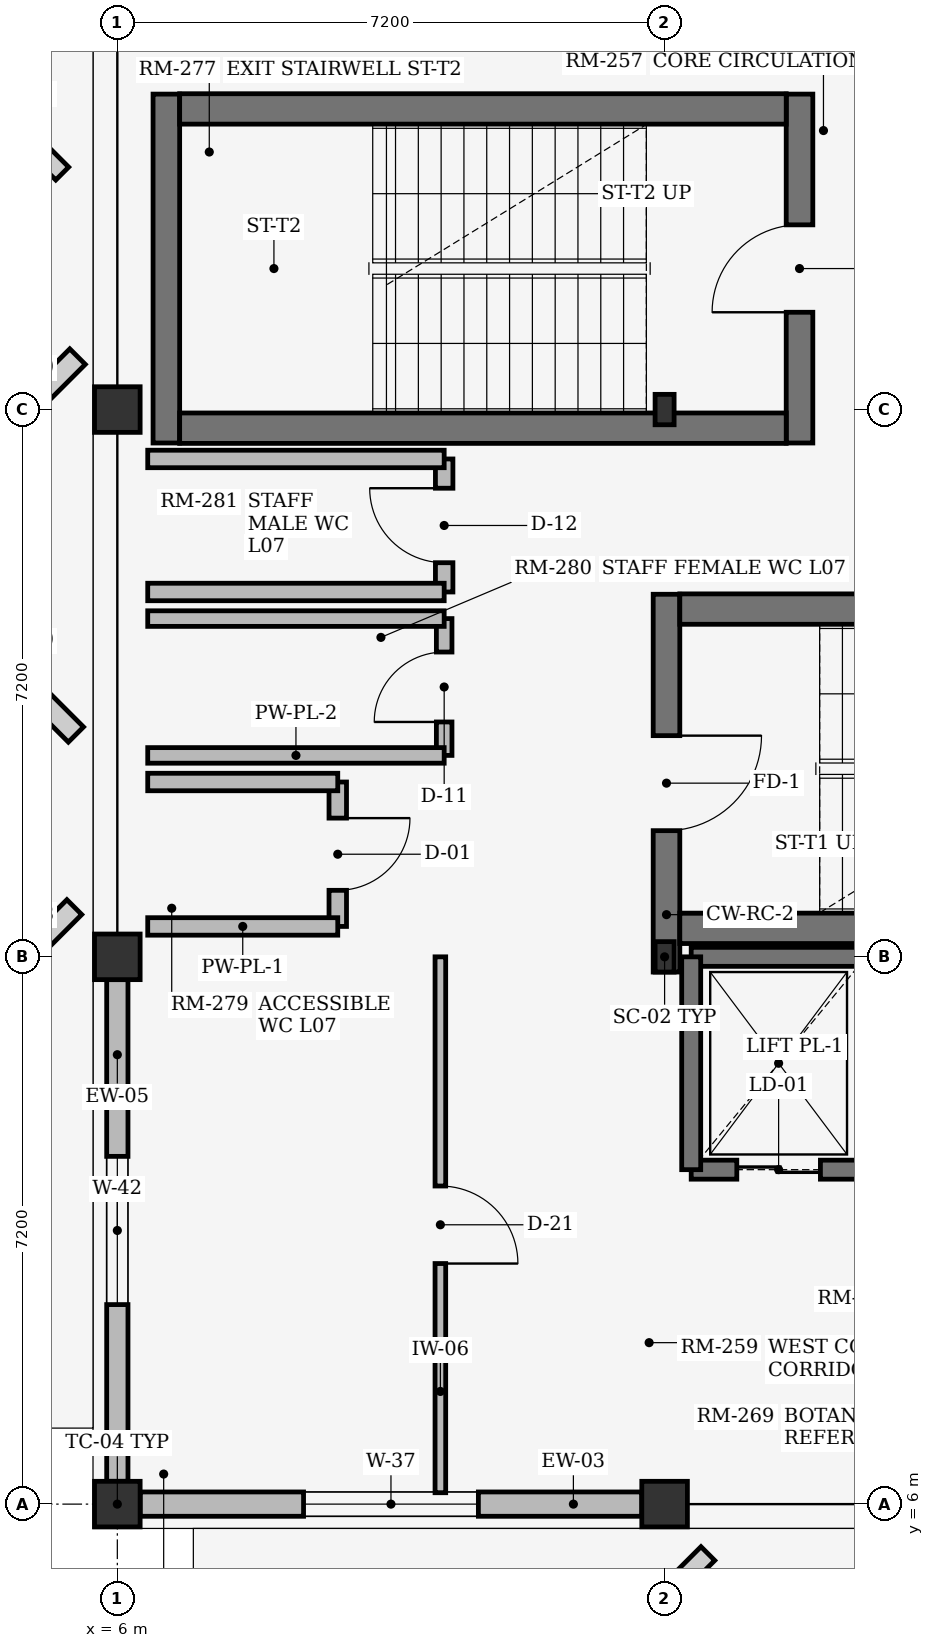
"""IFC4 building model, lengths in metres.
Left out: names, types, materials, properties, quantities, classifications, styles, units other than length and angle.
Written with IfcOpenShell. Run it as: python <this file> out.ifc"""

import sys

from ifc_helpers import new_model, si_unit, direction, frame, frame_2d, origin, origin_2d, place, context, subcontext, project, spatial, rectangle, i_section, extrude, element, fill, save


model = new_model("IFC4")
c1 = context("Model", 3, precision=1e-05, world=origin(), true_north=direction((0.0, 1.0)))
c2 = subcontext(c1, "Body", "Model", "MODEL_VIEW")
j1 = project(units=[si_unit("LENGTHUNIT", "METRE"), si_unit("PLANEANGLEUNIT", "RADIAN")], contexts=[c1])
p1 = place(None, origin())
s1 = spatial("IfcSite", under=j1, at=p1, CompositionType="ELEMENT")
p2 = place(p1, origin())
s2 = spatial("IfcBuilding", under=s1, at=p2, CompositionType="ELEMENT")
p3 = place(p2, frame((0.0, 0.0, 28.8)))
s3 = spatial("IfcBuildingStorey", under=s2, at=p3, CompositionType="ELEMENT", Elevation=28.8)
for number, where, z_axis, x_axis in (
    (1, (6.0, 6.0, 0.0), (0.0, 0.0, 1.0), (1.0, 0.0, 0.0)),
    (2, (6.0, 13.2, 0.0), (0.0, 0.0, 1.0), (1.0, 0.0, 0.0)),
    (3, (6.0, 20.4, 0.0), (0.0, 0.0, 1.0), (1.0, 0.0, 0.0)),
    (4, (13.2, 6.0, 0.0), (0.0, 0.0, 1.0), (1.0, 0.0, 0.0)),
):
    element("IfcColumn", number, at=place(p3, frame(where, z_axis=z_axis, x_axis=x_axis)), inside=s3, PredefinedType="COLUMN", context=c2, shape_type="SweptSolid", body=[
        extrude(rectangle(XDim=0.6, YDim=0.6, at=origin_2d()), origin(), (0.0, 0.0, 1.0), 3.62),
    ])
for number, where, z_axis, x_axis in (
    (5, (13.2, 13.2, 0.0), (0.0, 0.0, 1.0), (1.0, 0.0, 0.0)),
    (6, (13.2, 20.4, 0.0), (0.0, 0.0, 1.0), (1.0, 0.0, 0.0)),
):
    element("IfcColumn", number, at=place(p3, frame(where, z_axis=z_axis, x_axis=x_axis)), inside=s3, PredefinedType="COLUMN", context=c2, shape_type="SweptSolid", body=[
        extrude(i_section(OverallWidth=0.25, OverallDepth=0.4, WebThickness=0.01, FlangeThickness=0.013, at=origin_2d()), origin(), (0.0, 0.0, 1.0), 3.62),
    ])
p4 = place(p3, frame((6.3, 6.0, 0.0), z_axis=(0.0, 0.0, 1.0), x_axis=(1.0, 0.0, 0.0)))
e7 = element("IfcWall", 7, at=p4, inside=s3, PredefinedType="STANDARD", context=c2, shape_type="SweptSolid", body=[
    extrude(rectangle(XDim=6.6, YDim=0.32, at=frame_2d((3.3, 0.0))), origin(), (0.0, 0.0, 1.0), 3.1),
])
p5 = place(p4, frame((2.15, 0.0, 0.75)))
e8 = element("IfcOpeningElement", 8, at=p5, cuts=e7, PredefinedType="OPENING", context=c2, shape_type="SweptSolid", body=[
    extrude(rectangle(XDim=2.3, YDim=1.35, at=frame_2d((1.15, 0.675))), frame((0.0, 0.17, 0.0), z_axis=(0.0, -1.0, 0.0), x_axis=(1.0, 0.0, 0.0)), (0.0, 0.0, 1.0), 0.34),
])
p6 = place(p3, frame((6.0, 6.3, 0.0), z_axis=(0.0, 0.0, 1.0), x_axis=(0.0, 1.0, 0.0)))
e9 = element("IfcWall", 9, at=p6, inside=s3, PredefinedType="STANDARD", context=c2, shape_type="SweptSolid", body=[
    extrude(rectangle(XDim=6.6, YDim=0.28, at=frame_2d((3.3, 0.0))), origin(), (0.0, 0.0, 1.0), 3.1),
])
p7 = place(p6, frame((2.325, 0.0, 0.75)))
e10 = element("IfcOpeningElement", 10, at=p7, cuts=e9, PredefinedType="OPENING", context=c2, shape_type="SweptSolid", body=[
    extrude(rectangle(XDim=1.95, YDim=1.5, at=frame_2d((0.975, 0.75))), frame((0.0, 0.15, 0.0), z_axis=(0.0, -1.0, 0.0), x_axis=(1.0, 0.0, 0.0)), (0.0, 0.0, 1.0), 0.3),
])
p8 = place(p3, frame((13.225, 13.0, 0.0), z_axis=(0.0, 0.0, 1.0), x_axis=(0.0, 1.0, 0.0)))
e11 = element("IfcWall", 11, at=p8, inside=s3, PredefinedType="SHEAR", context=c2, shape_type="SweptSolid", body=[
    extrude(rectangle(XDim=4.97, YDim=0.35, at=frame_2d((2.485, 0.0))), origin(), (0.0, 0.0, 1.0), 3.62),
])
p9 = place(p8, frame((1.86, 0.0, 0.0)))
e12 = element("IfcOpeningElement", 12, at=p9, cuts=e11, PredefinedType="OPENING", context=c2, shape_type="SweptSolid", body=[
    extrude(rectangle(XDim=1.25, YDim=2.2, at=frame_2d((0.625, 1.1))), frame((0.0, 0.185, 0.0), z_axis=(0.0, -1.0, 0.0), x_axis=(1.0, 0.0, 0.0)), (0.0, 0.0, 1.0), 0.37),
])
for number, where, z_axis, x_axis in (
    (13, (13.4, 13.575, 0.0), (0.0, 0.0, 1.0), (1.0, 0.0, 0.0)),
    (14, (13.4, 17.775, 0.0), (0.0, 0.0, 1.0), (1.0, 0.0, 0.0)),
):
    element("IfcWall", number, at=place(p3, frame(where, z_axis=z_axis, x_axis=x_axis)), inside=s3, PredefinedType="SHEAR", context=c2, shape_type="SweptSolid", body=[
        extrude(rectangle(XDim=7.98, YDim=0.4, at=frame_2d((3.99, 0.0))), origin(), (0.0, 0.0, 1.0), 3.62),
    ])
p10 = place(p3, frame((14.975, 24.55, 0.0), z_axis=(0.0, 0.0, 1.0), x_axis=(0.0, -1.0, 0.0)))
e15 = element("IfcWall", 15, at=p10, inside=s3, PredefinedType="SHEAR", context=c2, shape_type="SweptSolid", body=[
    extrude(rectangle(XDim=4.59, YDim=0.35, at=frame_2d((2.295, 0.0))), origin(), (0.0, 0.0, 1.0), 3.62),
])
p11 = place(p10, frame((1.72, 0.0, 0.0)))
e16 = element("IfcOpeningElement", 16, at=p11, cuts=e15, PredefinedType="OPENING", context=c2, shape_type="SweptSolid", body=[
    extrude(rectangle(XDim=1.15, YDim=2.2, at=frame_2d((0.575, 1.1))), frame((0.0, 0.185, 0.0), z_axis=(0.0, -1.0, 0.0), x_axis=(1.0, 0.0, 0.0)), (0.0, 0.0, 1.0), 0.37),
])
p12 = place(p3, frame((6.645, 24.55, 0.0), z_axis=(0.0, 0.0, 1.0), x_axis=(0.0, -1.0, 0.0)))
e17 = element("IfcWall", 17, at=p12, inside=s3, PredefinedType="SHEAR", context=c2, shape_type="SweptSolid", body=[
    extrude(rectangle(XDim=4.59, YDim=0.35, at=frame_2d((2.295, 0.0))), origin(), (0.0, 0.0, 1.0), 3.62),
])
for number, where, z_axis, x_axis in (
    (18, (14.8, 24.355, 0.0), (0.0, 0.0, 1.0), (-1.0, 0.0, 0.0)),
    (19, (14.8, 20.155, 0.0), (0.0, 0.0, 1.0), (-1.0, 0.0, 0.0)),
):
    element("IfcWall", number, at=place(p3, frame(where, z_axis=z_axis, x_axis=x_axis)), inside=s3, PredefinedType="SHEAR", context=c2, shape_type="SweptSolid", body=[
        extrude(rectangle(XDim=7.98, YDim=0.4, at=frame_2d((3.99, 0.0))), origin(), (0.0, 0.0, 1.0), 3.62),
    ])
p13 = place(p3, frame((13.55, 10.4, 0.0), z_axis=(0.0, 0.0, 1.0), x_axis=(1.0, 0.0, 0.0)))
e20 = element("IfcWall", 20, at=p13, inside=s3, PredefinedType="SHEAR", context=c2, shape_type="SweptSolid", body=[
    extrude(rectangle(XDim=2.3, YDim=0.25, at=frame_2d((1.15, 0.0))), origin(), (0.0, 0.0, 1.0), 3.62),
])
p14 = place(p13, frame((0.6, 0.0, 0.0)))
e21 = element("IfcOpeningElement", 21, at=p14, cuts=e20, PredefinedType="OPENING", context=c2, shape_type="SweptSolid", body=[
    extrude(rectangle(XDim=1.1, YDim=2.2, at=frame_2d((0.55, 1.1))), frame((0.0, 0.135, 0.0), z_axis=(0.0, -1.0, 0.0), x_axis=(1.0, 0.0, 0.0)), (0.0, 0.0, 1.0), 0.27),
])
p15 = place(p3, frame((13.55, 13.2, 0.0), z_axis=(0.0, 0.0, 1.0), x_axis=(1.0, 0.0, 0.0)))
e22 = element("IfcWall", 22, at=p15, inside=s3, PredefinedType="SHEAR", context=c2, shape_type="SweptSolid", body=[
    extrude(rectangle(XDim=2.3, YDim=0.25, at=frame_2d((1.15, 0.0))), origin(), (0.0, 0.0, 1.0), 3.62),
])
p16 = place(p3, frame((13.55, 10.4, 0.0), z_axis=(0.0, 0.0, 1.0), x_axis=(0.0, 1.0, 0.0)))
e23 = element("IfcWall", 23, at=p16, inside=s3, PredefinedType="SHEAR", context=c2, shape_type="SweptSolid", body=[
    extrude(rectangle(XDim=2.8, YDim=0.25, at=frame_2d((1.4, 0.0))), origin(), (0.0, 0.0, 1.0), 3.62),
])
p17 = place(p3, frame((8.9, 13.6, 0.0), z_axis=(0.0, 0.0, 1.0), x_axis=(0.0, 1.0, 0.0)))
e24 = element("IfcWall", 24, at=p17, inside=s3, PredefinedType="PLUMBINGWALL", context=c2, shape_type="SweptSolid", body=[
    extrude(rectangle(XDim=1.9, YDim=0.23, at=frame_2d((0.95, 0.0))), origin(), (0.0, 0.0, 1.0), 3.6),
])
p18 = place(p17, frame((0.475, 0.0, 0.0)))
e25 = element("IfcOpeningElement", 25, at=p18, cuts=e24, PredefinedType="OPENING", context=c2, shape_type="SweptSolid", body=[
    extrude(rectangle(XDim=0.95, YDim=2.15, at=frame_2d((0.475, 1.075))), frame((0.0, 0.125, 0.0), z_axis=(0.0, -1.0, 0.0), x_axis=(1.0, 0.0, 0.0)), (0.0, 0.0, 1.0), 0.25),
])
for number, where, z_axis, x_axis in (
    (26, (6.4, 13.6, 0.0), (0.0, 0.0, 1.0), (1.0, 0.0, 0.0)),
    (27, (6.4, 15.5, 0.0), (0.0, 0.0, 1.0), (1.0, 0.0, 0.0)),
):
    element("IfcWall", number, at=place(p3, frame(where, z_axis=z_axis, x_axis=x_axis)), inside=s3, PredefinedType="PLUMBINGWALL", context=c2, shape_type="SweptSolid", body=[
        extrude(rectangle(XDim=2.5, YDim=0.23, at=frame_2d((1.25, 0.0))), origin(), (0.0, 0.0, 1.0), 3.6),
    ])
p19 = place(p3, frame((10.3, 15.85, 0.0), z_axis=(0.0, 0.0, 1.0), x_axis=(0.0, 1.0, 0.0)))
e28 = element("IfcWall", 28, at=p19, inside=s3, PredefinedType="PLUMBINGWALL", context=c2, shape_type="SweptSolid", body=[
    extrude(rectangle(XDim=1.8, YDim=0.205, at=frame_2d((0.9, 0.0))), origin(), (0.0, 0.0, 1.0), 3.6),
])
p20 = place(p19, frame((0.44, 0.0, 0.0)))
e29 = element("IfcOpeningElement", 29, at=p20, cuts=e28, PredefinedType="OPENING", context=c2, shape_type="SweptSolid", body=[
    extrude(rectangle(XDim=0.92, YDim=2.1, at=frame_2d((0.46, 1.05))), frame((0.0, 0.113, 0.0), z_axis=(0.0, -1.0, 0.0), x_axis=(1.0, 0.0, 0.0)), (0.0, 0.0, 1.0), 0.225),
])
for number, where, z_axis, x_axis in (
    (30, (6.4, 15.85, 0.0), (0.0, 0.0, 1.0), (1.0, 0.0, 0.0)),
    (31, (6.4, 17.65, 0.0), (0.0, 0.0, 1.0), (1.0, 0.0, 0.0)),
):
    element("IfcWall", number, at=place(p3, frame(where, z_axis=z_axis, x_axis=x_axis)), inside=s3, PredefinedType="PLUMBINGWALL", context=c2, shape_type="SweptSolid", body=[
        extrude(rectangle(XDim=3.9, YDim=0.205, at=frame_2d((1.95, 0.0))), origin(), (0.0, 0.0, 1.0), 3.6),
    ])
p21 = place(p3, frame((10.3, 18.0, 0.0), z_axis=(0.0, 0.0, 1.0), x_axis=(0.0, 1.0, 0.0)))
e32 = element("IfcWall", 32, at=p21, inside=s3, PredefinedType="PLUMBINGWALL", context=c2, shape_type="SweptSolid", body=[
    extrude(rectangle(XDim=1.75, YDim=0.23, at=frame_2d((0.875, 0.0))), origin(), (0.0, 0.0, 1.0), 3.6),
])
p22 = place(p21, frame((0.385, 0.0, 0.0)))
e33 = element("IfcOpeningElement", 33, at=p22, cuts=e32, PredefinedType="OPENING", context=c2, shape_type="SweptSolid", body=[
    extrude(rectangle(XDim=0.98, YDim=2.1, at=frame_2d((0.49, 1.05))), frame((0.0, 0.125, 0.0), z_axis=(0.0, -1.0, 0.0), x_axis=(1.0, 0.0, 0.0)), (0.0, 0.0, 1.0), 0.25),
])
for number, where, z_axis, x_axis in (
    (34, (6.4, 18.0, 0.0), (0.0, 0.0, 1.0), (1.0, 0.0, 0.0)),
    (35, (6.4, 19.75, 0.0), (0.0, 0.0, 1.0), (1.0, 0.0, 0.0)),
):
    element("IfcWall", number, at=place(p3, frame(where, z_axis=z_axis, x_axis=x_axis)), inside=s3, PredefinedType="PLUMBINGWALL", context=c2, shape_type="SweptSolid", body=[
        extrude(rectangle(XDim=3.9, YDim=0.23, at=frame_2d((1.95, 0.0))), origin(), (0.0, 0.0, 1.0), 3.6),
    ])
p23 = place(p3, frame((10.25, 6.15, 0.0), z_axis=(0.0, 0.0, 1.0), x_axis=(0.0, 1.0, 0.0)))
e36 = element("IfcWall", 36, at=p23, inside=s3, PredefinedType="PARTITIONING", context=c2, shape_type="SweptSolid", body=[
    extrude(rectangle(XDim=7.05, YDim=0.14, at=frame_2d((3.525, 0.0))), origin(), (0.0, 0.0, 1.0), 3.6),
])
p24 = place(p23, frame((3.015, 0.0, 0.0)))
e37 = element("IfcOpeningElement", 37, at=p24, cuts=e36, PredefinedType="OPENING", context=c2, shape_type="SweptSolid", body=[
    extrude(rectangle(XDim=1.02, YDim=2.18, at=frame_2d((0.51, 1.09))), frame((0.0, 0.08, 0.0), z_axis=(0.0, -1.0, 0.0), x_axis=(1.0, 0.0, 0.0)), (0.0, 0.0, 1.0), 0.16),
])
p25 = place(p5, origin())
e38 = element("IfcWindow", 38, at=p25, inside=s3, PartitioningType="SINGLE_PANEL", PredefinedType="WINDOW", context=c2, shape_type="SweptSolid", body=[
    extrude(rectangle(XDim=2.3, YDim=1.35, at=frame_2d((1.15, 0.675))), frame((0.0, 0.03, 0.0), z_axis=(0.0, -1.0, 0.0), x_axis=(1.0, 0.0, 0.0)), (0.0, 0.0, 1.0), 0.06),
])
fill(e8, e38)
p26 = place(p7, origin())
e39 = element("IfcWindow", 39, at=p26, inside=s3, PartitioningType="SINGLE_PANEL", PredefinedType="WINDOW", context=c2, shape_type="SweptSolid", body=[
    extrude(rectangle(XDim=1.95, YDim=1.5, at=frame_2d((0.975, 0.75))), frame((0.0, 0.03, 0.0), z_axis=(0.0, -1.0, 0.0), x_axis=(1.0, 0.0, 0.0)), (0.0, 0.0, 1.0), 0.06),
])
fill(e10, e39)
p27 = place(p9, origin())
e40 = element("IfcDoor", 40, at=p27, inside=s3, OperationType="SINGLE_SWING_RIGHT", PredefinedType="DOOR", context=c2, shape_type="SweptSolid", body=[
    extrude(rectangle(XDim=1.25, YDim=2.2, at=frame_2d((0.625, 1.1))), frame((0.0, 0.025, 0.0), z_axis=(0.0, -1.0, 0.0), x_axis=(1.0, 0.0, 0.0)), (0.0, 0.0, 1.0), 0.05),
])
fill(e12, e40)
p28 = place(p11, origin())
e41 = element("IfcDoor", 41, at=p28, inside=s3, OperationType="SINGLE_SWING_RIGHT", PredefinedType="DOOR", context=c2, shape_type="SweptSolid", body=[
    extrude(rectangle(XDim=1.15, YDim=2.2, at=frame_2d((0.575, 1.1))), frame((0.0, 0.025, 0.0), z_axis=(0.0, -1.0, 0.0), x_axis=(1.0, 0.0, 0.0)), (0.0, 0.0, 1.0), 0.05),
])
fill(e16, e41)
p29 = place(p14, origin())
e42 = element("IfcDoor", 42, at=p29, inside=s3, OperationType="DOUBLE_DOOR_SLIDING", PredefinedType="DOOR", context=c2, shape_type="SweptSolid", body=[
    extrude(rectangle(XDim=1.1, YDim=2.2, at=frame_2d((0.55, 1.1))), frame((0.0, 0.025, 0.0), z_axis=(0.0, -1.0, 0.0), x_axis=(1.0, 0.0, 0.0)), (0.0, 0.0, 1.0), 0.05),
])
fill(e21, e42)
p30 = place(p18, origin())
e43 = element("IfcDoor", 43, at=p30, inside=s3, OperationType="SINGLE_SWING_RIGHT", PredefinedType="DOOR", context=c2, shape_type="SweptSolid", body=[
    extrude(rectangle(XDim=0.95, YDim=2.15, at=frame_2d((0.475, 1.075))), frame((0.0, 0.025, 0.0), z_axis=(0.0, -1.0, 0.0), x_axis=(1.0, 0.0, 0.0)), (0.0, 0.0, 1.0), 0.05),
])
fill(e25, e43)
p31 = place(p20, origin())
e44 = element("IfcDoor", 44, at=p31, inside=s3, OperationType="SINGLE_SWING_LEFT", PredefinedType="DOOR", context=c2, shape_type="SweptSolid", body=[
    extrude(rectangle(XDim=0.92, YDim=2.1, at=frame_2d((0.46, 1.05))), frame((0.0, 0.025, 0.0), z_axis=(0.0, -1.0, 0.0), x_axis=(1.0, 0.0, 0.0)), (0.0, 0.0, 1.0), 0.05),
])
fill(e29, e44)
p32 = place(p22, frame((0.98, 0.0, 0.0), z_axis=(0.0, 0.0, 1.0), x_axis=(-1.0, 0.0, 0.0)))
e45 = element("IfcDoor", 45, at=p32, inside=s3, OperationType="SINGLE_SWING_RIGHT", PredefinedType="DOOR", context=c2, shape_type="SweptSolid", body=[
    extrude(rectangle(XDim=0.98, YDim=2.1, at=frame_2d((0.49, 1.05))), frame((0.0, 0.025, 0.0), z_axis=(0.0, -1.0, 0.0), x_axis=(1.0, 0.0, 0.0)), (0.0, 0.0, 1.0), 0.05),
])
fill(e33, e45)
p33 = place(p24, frame((1.02, 0.0, 0.0), z_axis=(0.0, 0.0, 1.0), x_axis=(-1.0, 0.0, 0.0)))
e46 = element("IfcDoor", 46, at=p33, inside=s3, OperationType="SINGLE_SWING_LEFT", PredefinedType="DOOR", context=c2, shape_type="SweptSolid", body=[
    extrude(rectangle(XDim=1.02, YDim=2.18, at=frame_2d((0.51, 1.09))), frame((0.0, 0.025, 0.0), z_axis=(0.0, -1.0, 0.0), x_axis=(1.0, 0.0, 0.0)), (0.0, 0.0, 1.0), 0.05),
])
fill(e37, e46)
save(model, sys.argv[1])
